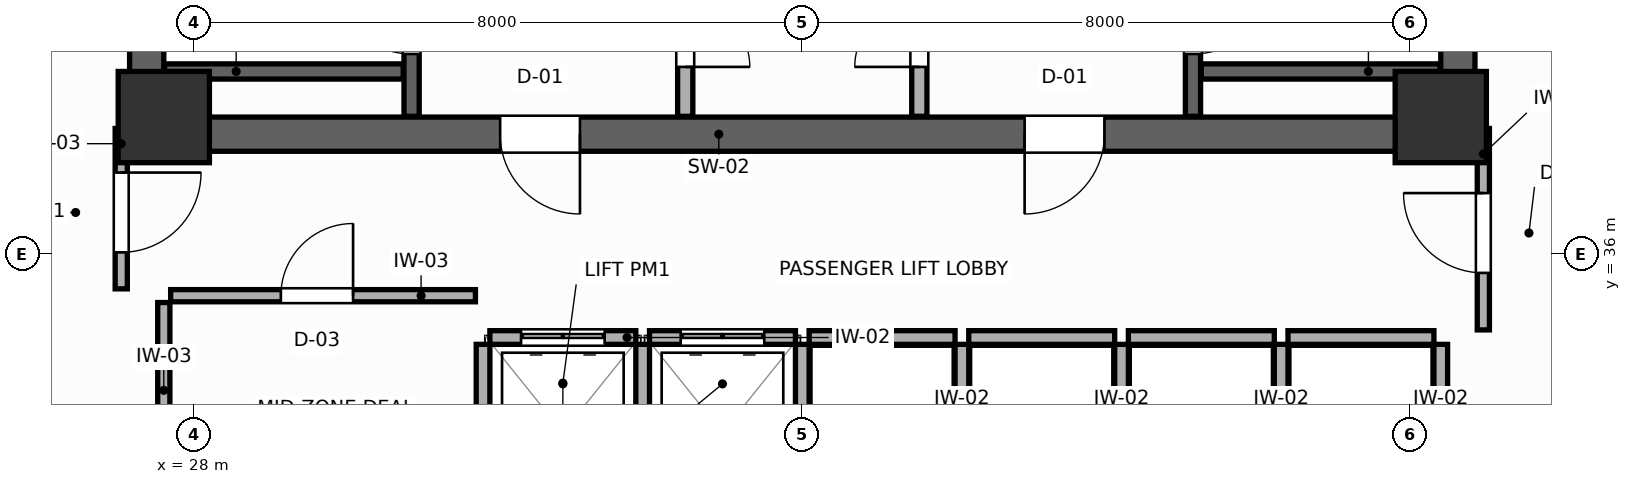
"""IFC4 building model, lengths in metres.
Left out: names, types, materials, properties, quantities, classifications, styles, units other than length and angle.
Written with IfcOpenShell. Run it as: python <this file> out.ifc"""

import sys

from ifc_helpers import new_model, si_unit, direction, frame, frame_2d, origin, origin_2d, place, context, subcontext, project, spatial, rectangle, extrude, source, transform, mapped, element, fill, save


model = new_model("IFC4")
c1 = context("Model", 3, precision=1e-05, world=origin(), true_north=direction((0.0, 1.0)))
c2 = subcontext(c1, "Body", "Model", "MODEL_VIEW")
j1 = project(units=[si_unit("LENGTHUNIT", "METRE"), si_unit("PLANEANGLEUNIT", "RADIAN")], contexts=[c1])
p1 = place(None, origin())
s1 = spatial("IfcSite", under=j1, at=p1, CompositionType="ELEMENT")
p2 = place(p1, origin())
s2 = spatial("IfcBuilding", under=s1, at=p2, CompositionType="ELEMENT")
p3 = place(p2, frame((0.0, 0.0, 127.8)))
s3 = spatial("IfcBuildingStorey", under=s2, at=p3, CompositionType="ELEMENT", Elevation=127.8)
p4 = place(p3, frame((27.15, 37.575, 0.0), z_axis=(0.0, 0.0, 1.0), x_axis=(1.0, 0.0, 0.0)))
e1 = element("IfcWall", 1, at=p4, inside=s3, PredefinedType="SHEAR", context=c2, shape_type="SweptSolid", body=[
    extrude(rectangle(XDim=17.7, YDim=0.45, at=frame_2d((8.85, 0.0))), origin(), (0.0, 0.0, 1.0), 3.6),
])
p5 = place(p4, frame((4.875, 0.0, 0.0)))
e2 = element("IfcOpeningElement", 2, at=p5, cuts=e1, PredefinedType="OPENING", context=c2, shape_type="SweptSolid", body=[
    extrude(rectangle(XDim=1.05, YDim=2.1, at=frame_2d((0.525, 1.05))), frame((0.0, 0.235, 0.0), z_axis=(0.0, -1.0, 0.0), x_axis=(1.0, 0.0, 0.0)), (0.0, 0.0, 1.0), 0.47),
])
p6 = place(p4, frame((11.775, 0.0, 0.0)))
e3 = element("IfcOpeningElement", 3, at=p6, cuts=e1, PredefinedType="OPENING", context=c2, shape_type="SweptSolid", body=[
    extrude(rectangle(XDim=1.05, YDim=2.1, at=frame_2d((0.525, 1.05))), frame((0.0, 0.235, 0.0), z_axis=(0.0, -1.0, 0.0), x_axis=(1.0, 0.0, 0.0)), (0.0, 0.0, 1.0), 0.47),
])
for number, where, z_axis, x_axis in (
    (4, (27.375, 37.8, 0.0), (0.0, 0.0, 1.0), (0.0, 1.0, 0.0)),
    (5, (44.625, 37.8, 0.0), (0.0, 0.0, 1.0), (0.0, 1.0, 0.0)),
):
    element("IfcWall", number, at=place(p3, frame(where, z_axis=z_axis, x_axis=x_axis)), inside=s3, PredefinedType="SHEAR", context=c2, shape_type="SweptSolid", body=[
        extrude(rectangle(XDim=9.0, YDim=0.45, at=frame_2d((4.5, 0.0))), origin(), (0.0, 0.0, 1.0), 3.6),
    ])
m1 = source(origin(), c2, "Body", "SweptSolid", [
    extrude(rectangle(XDim=1.2, YDim=1.2, at=origin_2d()), origin(), (0.0, 0.0, 1.0), 3.6),
])
for number, where, z_axis, x_axis in (
    (6, (27.6, 37.8, 0.0), (0.0, 0.0, 1.0), (1.0, 0.0, 0.0)),
    (7, (44.4, 37.8, 0.0), (0.0, 0.0, 1.0), (1.0, 0.0, 0.0)),
):
    element("IfcColumn", number, at=place(p3, frame(where, z_axis=z_axis, x_axis=x_axis)), inside=s3, PredefinedType="COLUMN", context=c2, shape_type="MappedRepresentation", body=[
        mapped(m1, transform((0.0, 0.0, 0.0), scale=1.0)),
    ])
p7 = place(p3, frame((30.86, 37.81, 0.0), z_axis=(0.0, 0.0, 1.0), x_axis=(0.0, 1.0, 0.0)))
e8 = element("IfcWall", 8, at=p7, inside=s3, PredefinedType="SHEAR", context=c2, shape_type="SweptSolid", body=[
    extrude(rectangle(XDim=8.98, YDim=0.2, at=frame_2d((4.49, 0.0))), origin(), (0.0, 0.0, 1.0), 3.6),
])
p8 = place(p7, frame((0.82, 0.0, 0.0)))
e9 = element("IfcOpeningElement", 9, at=p8, cuts=e8, PredefinedType="OPENING", context=c2, shape_type="SweptSolid", body=[
    extrude(rectangle(XDim=1.05, YDim=2.1, at=frame_2d((0.525, 1.05))), frame((0.0, 0.11, 0.0), z_axis=(0.0, -1.0, 0.0), x_axis=(1.0, 0.0, 0.0)), (0.0, 0.0, 1.0), 0.22),
])
p9 = place(p3, frame((27.61, 38.4, 0.0), z_axis=(0.0, 0.0, 1.0), x_axis=(1.0, 0.0, 0.0)))
e10 = element("IfcWall", 10, at=p9, inside=s3, PredefinedType="SHEAR", context=c2, shape_type="SweptSolid", body=[
    extrude(rectangle(XDim=3.14, YDim=0.2, at=frame_2d((1.57, 0.0))), origin(), (0.0, 0.0, 1.0), 3.6),
])
p10 = place(p3, frame((41.14, 37.81, 0.0), z_axis=(0.0, 0.0, 1.0), x_axis=(0.0, 1.0, 0.0)))
e11 = element("IfcWall", 11, at=p10, inside=s3, PredefinedType="SHEAR", context=c2, shape_type="SweptSolid", body=[
    extrude(rectangle(XDim=8.98, YDim=0.2, at=frame_2d((4.49, 0.0))), origin(), (0.0, 0.0, 1.0), 3.6),
])
p11 = place(p10, frame((0.82, 0.0, 0.0)))
e12 = element("IfcOpeningElement", 12, at=p11, cuts=e11, PredefinedType="OPENING", context=c2, shape_type="SweptSolid", body=[
    extrude(rectangle(XDim=1.05, YDim=2.1, at=frame_2d((0.525, 1.05))), frame((0.0, 0.11, 0.0), z_axis=(0.0, -1.0, 0.0), x_axis=(1.0, 0.0, 0.0)), (0.0, 0.0, 1.0), 0.22),
])
p12 = place(p3, frame((41.25, 38.4, 0.0), z_axis=(0.0, 0.0, 1.0), x_axis=(1.0, 0.0, 0.0)))
e13 = element("IfcWall", 13, at=p12, inside=s3, PredefinedType="SHEAR", context=c2, shape_type="SweptSolid", body=[
    extrude(rectangle(XDim=3.14, YDim=0.2, at=frame_2d((1.57, 0.0))), origin(), (0.0, 0.0, 1.0), 3.6),
])
p13 = place(p3, frame((34.46, 37.81, 0.0), z_axis=(0.0, 0.0, 1.0), x_axis=(0.0, 1.0, 0.0)))
e14 = element("IfcWall", 14, at=p13, inside=s3, PredefinedType="PARTITIONING", context=c2, shape_type="SweptSolid", body=[
    extrude(rectangle(XDim=8.98, YDim=0.2, at=frame_2d((4.49, 0.0))), origin(), (0.0, 0.0, 1.0), 3.26),
])
p14 = place(p13, frame((0.65, 0.0, 0.0)))
e15 = element("IfcOpeningElement", 15, at=p14, cuts=e14, PredefinedType="OPENING", context=c2, shape_type="SweptSolid", body=[
    extrude(rectangle(XDim=0.85, YDim=2.05, at=frame_2d((0.425, 1.025))), frame((0.0, 0.11, 0.0), z_axis=(0.0, -1.0, 0.0), x_axis=(1.0, 0.0, 0.0)), (0.0, 0.0, 1.0), 0.22),
])
p15 = place(p3, frame((37.54, 37.81, 0.0), z_axis=(0.0, 0.0, 1.0), x_axis=(0.0, 1.0, 0.0)))
e16 = element("IfcWall", 16, at=p15, inside=s3, PredefinedType="PARTITIONING", context=c2, shape_type="SweptSolid", body=[
    extrude(rectangle(XDim=8.98, YDim=0.2, at=frame_2d((4.49, 0.0))), origin(), (0.0, 0.0, 1.0), 3.26),
])
p16 = place(p15, frame((0.65, 0.0, 0.0)))
e17 = element("IfcOpeningElement", 17, at=p16, cuts=e16, PredefinedType="OPENING", context=c2, shape_type="SweptSolid", body=[
    extrude(rectangle(XDim=0.85, YDim=2.05, at=frame_2d((0.425, 1.025))), frame((0.0, 0.11, 0.0), z_axis=(0.0, -1.0, 0.0), x_axis=(1.0, 0.0, 0.0)), (0.0, 0.0, 1.0), 0.22),
])
p17 = place(p3, frame((31.89, 34.9, 0.0), z_axis=(0.0, 0.0, 1.0), x_axis=(1.0, 0.0, 0.0)))
e18 = element("IfcWall", 18, at=p17, inside=s3, PredefinedType="PARTITIONING", context=c2, shape_type="SweptSolid", body=[
    extrude(rectangle(XDim=1.92, YDim=0.18, at=frame_2d((0.96, 0.0))), origin(), (0.0, 0.0, 1.0), 3.26),
])
p18 = place(p17, frame((0.41, 0.0, 0.0)))
e19 = element("IfcOpeningElement", 19, at=p18, cuts=e18, PredefinedType="OPENING", context=c2, shape_type="SweptSolid", body=[
    extrude(rectangle(XDim=1.1, YDim=2.1, at=frame_2d((0.55, 1.05))), frame((0.0, 0.1, 0.0), z_axis=(0.0, -1.0, 0.0), x_axis=(1.0, 0.0, 0.0)), (0.0, 0.0, 1.0), 0.2),
])
p19 = place(p3, frame((31.8, 32.49, 0.0), z_axis=(0.0, 0.0, 1.0), x_axis=(0.0, 1.0, 0.0)))
e20 = element("IfcWall", 20, at=p19, inside=s3, PredefinedType="PARTITIONING", context=c2, shape_type="SweptSolid", body=[
    extrude(rectangle(XDim=2.32, YDim=0.18, at=frame_2d((1.16, 0.0))), origin(), (0.0, 0.0, 1.0), 3.26),
])
p20 = place(p3, frame((33.99, 34.9, 0.0), z_axis=(0.0, 0.0, 1.0), x_axis=(1.0, 0.0, 0.0)))
e21 = element("IfcWall", 21, at=p20, inside=s3, PredefinedType="PARTITIONING", context=c2, shape_type="SweptSolid", body=[
    extrude(rectangle(XDim=1.92, YDim=0.18, at=frame_2d((0.96, 0.0))), origin(), (0.0, 0.0, 1.0), 3.26),
])
p21 = place(p20, frame((0.41, 0.0, 0.0)))
e22 = element("IfcOpeningElement", 22, at=p21, cuts=e21, PredefinedType="OPENING", context=c2, shape_type="SweptSolid", body=[
    extrude(rectangle(XDim=1.1, YDim=2.1, at=frame_2d((0.55, 1.05))), frame((0.0, 0.1, 0.0), z_axis=(0.0, -1.0, 0.0), x_axis=(1.0, 0.0, 0.0)), (0.0, 0.0, 1.0), 0.2),
])
p22 = place(p3, frame((33.9, 32.49, 0.0), z_axis=(0.0, 0.0, 1.0), x_axis=(0.0, 1.0, 0.0)))
e23 = element("IfcWall", 23, at=p22, inside=s3, PredefinedType="PARTITIONING", context=c2, shape_type="SweptSolid", body=[
    extrude(rectangle(XDim=2.32, YDim=0.18, at=frame_2d((1.16, 0.0))), origin(), (0.0, 0.0, 1.0), 3.26),
])
p23 = place(p3, frame((36.09, 34.9, 0.0), z_axis=(0.0, 0.0, 1.0), x_axis=(1.0, 0.0, 0.0)))
e24 = element("IfcWall", 24, at=p23, inside=s3, PredefinedType="PARTITIONING", context=c2, shape_type="SweptSolid", body=[
    extrude(rectangle(XDim=1.92, YDim=0.18, at=frame_2d((0.96, 0.0))), origin(), (0.0, 0.0, 1.0), 3.26),
])
p24 = place(p3, frame((36.0, 32.49, 0.0), z_axis=(0.0, 0.0, 1.0), x_axis=(0.0, 1.0, 0.0)))
e25 = element("IfcWall", 25, at=p24, inside=s3, PredefinedType="PARTITIONING", context=c2, shape_type="SweptSolid", body=[
    extrude(rectangle(XDim=2.32, YDim=0.18, at=frame_2d((1.16, 0.0))), origin(), (0.0, 0.0, 1.0), 3.26),
])
p25 = place(p3, frame((38.19, 34.9, 0.0), z_axis=(0.0, 0.0, 1.0), x_axis=(1.0, 0.0, 0.0)))
e26 = element("IfcWall", 26, at=p25, inside=s3, PredefinedType="PARTITIONING", context=c2, shape_type="SweptSolid", body=[
    extrude(rectangle(XDim=1.92, YDim=0.18, at=frame_2d((0.96, 0.0))), origin(), (0.0, 0.0, 1.0), 3.26),
])
p26 = place(p3, frame((38.1, 32.49, 0.0), z_axis=(0.0, 0.0, 1.0), x_axis=(0.0, 1.0, 0.0)))
e27 = element("IfcWall", 27, at=p26, inside=s3, PredefinedType="PARTITIONING", context=c2, shape_type="SweptSolid", body=[
    extrude(rectangle(XDim=2.32, YDim=0.18, at=frame_2d((1.16, 0.0))), origin(), (0.0, 0.0, 1.0), 3.26),
])
p27 = place(p3, frame((40.29, 34.9, 0.0), z_axis=(0.0, 0.0, 1.0), x_axis=(1.0, 0.0, 0.0)))
e28 = element("IfcWall", 28, at=p27, inside=s3, PredefinedType="PARTITIONING", context=c2, shape_type="SweptSolid", body=[
    extrude(rectangle(XDim=1.92, YDim=0.18, at=frame_2d((0.96, 0.0))), origin(), (0.0, 0.0, 1.0), 3.26),
])
p28 = place(p3, frame((40.2, 32.49, 0.0), z_axis=(0.0, 0.0, 1.0), x_axis=(0.0, 1.0, 0.0)))
e29 = element("IfcWall", 29, at=p28, inside=s3, PredefinedType="PARTITIONING", context=c2, shape_type="SweptSolid", body=[
    extrude(rectangle(XDim=2.32, YDim=0.18, at=frame_2d((1.16, 0.0))), origin(), (0.0, 0.0, 1.0), 3.26),
])
p29 = place(p3, frame((42.39, 34.9, 0.0), z_axis=(0.0, 0.0, 1.0), x_axis=(1.0, 0.0, 0.0)))
e30 = element("IfcWall", 30, at=p29, inside=s3, PredefinedType="PARTITIONING", context=c2, shape_type="SweptSolid", body=[
    extrude(rectangle(XDim=1.92, YDim=0.18, at=frame_2d((0.96, 0.0))), origin(), (0.0, 0.0, 1.0), 3.26),
])
for number, where, z_axis, x_axis in (
    (31, (42.3, 32.49, 0.0), (0.0, 0.0, 1.0), (0.0, 1.0, 0.0)),
    (32, (44.4, 32.49, 0.0), (0.0, 0.0, 1.0), (0.0, 1.0, 0.0)),
):
    element("IfcWall", number, at=place(p3, frame(where, z_axis=z_axis, x_axis=x_axis)), inside=s3, PredefinedType="PARTITIONING", context=c2, shape_type="SweptSolid", body=[
        extrude(rectangle(XDim=2.32, YDim=0.18, at=frame_2d((1.16, 0.0))), origin(), (0.0, 0.0, 1.0), 3.26),
    ])
p30 = place(p3, frame((27.6, 33.05, 0.0), z_axis=(0.0, 0.0, 1.0), x_axis=(0.0, 1.0, 0.0)))
e33 = element("IfcWall", 33, at=p30, inside=s3, PredefinedType="PARTITIONING", context=c2, shape_type="SweptSolid", body=[
    extrude(rectangle(XDim=2.31, YDim=0.16, at=frame_2d((1.155, 0.0))), origin(), (0.0, 0.0, 1.0), 3.26),
])
p31 = place(p3, frame((27.69, 35.45, 0.0), z_axis=(0.0, 0.0, 1.0), x_axis=(1.0, 0.0, 0.0)))
e34 = element("IfcWall", 34, at=p31, inside=s3, PredefinedType="PARTITIONING", context=c2, shape_type="SweptSolid", body=[
    extrude(rectangle(XDim=4.01, YDim=0.16, at=frame_2d((2.005, 0.0))), origin(), (0.0, 0.0, 1.0), 3.26),
])
p32 = place(p31, frame((1.45, 0.0, 0.0)))
e35 = element("IfcOpeningElement", 35, at=p32, cuts=e34, PredefinedType="OPENING", context=c2, shape_type="SweptSolid", body=[
    extrude(rectangle(XDim=0.95, YDim=2.05, at=frame_2d((0.475, 1.025))), frame((0.0, 0.09, 0.0), z_axis=(0.0, -1.0, 0.0), x_axis=(1.0, 0.0, 0.0)), (0.0, 0.0, 1.0), 0.18),
])
p33 = place(p3, frame((27.04, 35.54, 0.0), z_axis=(0.0, 0.0, 1.0), x_axis=(0.0, 1.0, 0.0)))
e36 = element("IfcWall", 36, at=p33, inside=s3, PredefinedType="PARTITIONING", context=c2, shape_type="SweptSolid", body=[
    extrude(rectangle(XDim=2.11, YDim=0.16, at=frame_2d((1.055, 0.0))), origin(), (0.0, 0.0, 1.0), 3.26),
])
p34 = place(p33, frame((0.48, 0.0, 0.0)))
e37 = element("IfcOpeningElement", 37, at=p34, cuts=e36, PredefinedType="OPENING", context=c2, shape_type="SweptSolid", body=[
    extrude(rectangle(XDim=1.05, YDim=2.1, at=frame_2d((0.525, 1.05))), frame((0.0, 0.09, 0.0), z_axis=(0.0, -1.0, 0.0), x_axis=(1.0, 0.0, 0.0)), (0.0, 0.0, 1.0), 0.18),
])
p35 = place(p3, frame((44.96, 35.0, 0.0), z_axis=(0.0, 0.0, 1.0), x_axis=(0.0, 1.0, 0.0)))
e38 = element("IfcWall", 38, at=p35, inside=s3, PredefinedType="PARTITIONING", context=c2, shape_type="SweptSolid", body=[
    extrude(rectangle(XDim=2.65, YDim=0.16, at=frame_2d((1.325, 0.0))), origin(), (0.0, 0.0, 1.0), 3.26),
])
p36 = place(p35, frame((0.75, 0.0, 0.0)))
e39 = element("IfcOpeningElement", 39, at=p36, cuts=e38, PredefinedType="OPENING", context=c2, shape_type="SweptSolid", body=[
    extrude(rectangle(XDim=1.05, YDim=2.1, at=frame_2d((0.525, 1.05))), frame((0.0, 0.09, 0.0), z_axis=(0.0, -1.0, 0.0), x_axis=(1.0, 0.0, 0.0)), (0.0, 0.0, 1.0), 0.18),
])
p37 = place(p8, origin())
e40 = element("IfcDoor", 40, at=p37, inside=s3, OperationType="SINGLE_SWING_RIGHT", PredefinedType="DOOR", context=c2, shape_type="SweptSolid", body=[
    extrude(rectangle(XDim=1.05, YDim=2.1, at=frame_2d((0.525, 1.05))), frame((0.0, 0.025, 0.0), z_axis=(0.0, -1.0, 0.0), x_axis=(1.0, 0.0, 0.0)), (0.0, 0.0, 1.0), 0.05),
])
fill(e9, e40)
p38 = place(p11, frame((1.05, 0.0, 0.0), z_axis=(0.0, 0.0, 1.0), x_axis=(-1.0, 0.0, 0.0)))
e41 = element("IfcDoor", 41, at=p38, inside=s3, OperationType="SINGLE_SWING_LEFT", PredefinedType="DOOR", context=c2, shape_type="SweptSolid", body=[
    extrude(rectangle(XDim=1.05, YDim=2.1, at=frame_2d((0.525, 1.05))), frame((0.0, 0.025, 0.0), z_axis=(0.0, -1.0, 0.0), x_axis=(1.0, 0.0, 0.0)), (0.0, 0.0, 1.0), 0.05),
])
fill(e12, e41)
p39 = place(p14, frame((0.85, 0.0, 0.0), z_axis=(0.0, 0.0, 1.0), x_axis=(-1.0, 0.0, 0.0)))
e42 = element("IfcDoor", 42, at=p39, inside=s3, OperationType="SINGLE_SWING_RIGHT", PredefinedType="DOOR", context=c2, shape_type="SweptSolid", body=[
    extrude(rectangle(XDim=0.85, YDim=2.05, at=frame_2d((0.425, 1.025))), frame((0.0, 0.025, 0.0), z_axis=(0.0, -1.0, 0.0), x_axis=(1.0, 0.0, 0.0)), (0.0, 0.0, 1.0), 0.05),
])
fill(e15, e42)
p40 = place(p16, origin())
e43 = element("IfcDoor", 43, at=p40, inside=s3, OperationType="SINGLE_SWING_LEFT", PredefinedType="DOOR", context=c2, shape_type="SweptSolid", body=[
    extrude(rectangle(XDim=0.85, YDim=2.05, at=frame_2d((0.425, 1.025))), frame((0.0, 0.025, 0.0), z_axis=(0.0, -1.0, 0.0), x_axis=(1.0, 0.0, 0.0)), (0.0, 0.0, 1.0), 0.05),
])
fill(e17, e43)
p41 = place(p18, origin())
e44 = element("IfcDoor", 44, at=p41, inside=s3, OperationType="DOUBLE_DOOR_SLIDING", PredefinedType="DOOR", context=c2, shape_type="SweptSolid", body=[
    extrude(rectangle(XDim=1.1, YDim=2.1, at=frame_2d((0.55, 1.05))), frame((0.0, 0.025, 0.0), z_axis=(0.0, -1.0, 0.0), x_axis=(1.0, 0.0, 0.0)), (0.0, 0.0, 1.0), 0.05),
])
fill(e19, e44)
p42 = place(p21, origin())
e45 = element("IfcDoor", 45, at=p42, inside=s3, OperationType="DOUBLE_DOOR_SLIDING", PredefinedType="DOOR", context=c2, shape_type="SweptSolid", body=[
    extrude(rectangle(XDim=1.1, YDim=2.1, at=frame_2d((0.55, 1.05))), frame((0.0, 0.025, 0.0), z_axis=(0.0, -1.0, 0.0), x_axis=(1.0, 0.0, 0.0)), (0.0, 0.0, 1.0), 0.05),
])
fill(e22, e45)
p43 = place(p32, origin())
e46 = element("IfcDoor", 46, at=p43, inside=s3, OperationType="SINGLE_SWING_RIGHT", PredefinedType="DOOR", context=c2, shape_type="SweptSolid", body=[
    extrude(rectangle(XDim=0.95, YDim=2.05, at=frame_2d((0.475, 1.025))), frame((0.0, 0.025, 0.0), z_axis=(0.0, -1.0, 0.0), x_axis=(1.0, 0.0, 0.0)), (0.0, 0.0, 1.0), 0.05),
])
fill(e35, e46)
p44 = place(p34, frame((1.05, 0.0, 0.0), z_axis=(0.0, 0.0, 1.0), x_axis=(-1.0, 0.0, 0.0)))
e47 = element("IfcDoor", 47, at=p44, inside=s3, OperationType="SINGLE_SWING_LEFT", PredefinedType="DOOR", context=c2, shape_type="SweptSolid", body=[
    extrude(rectangle(XDim=1.05, YDim=2.1, at=frame_2d((0.525, 1.05))), frame((0.0, 0.025, 0.0), z_axis=(0.0, -1.0, 0.0), x_axis=(1.0, 0.0, 0.0)), (0.0, 0.0, 1.0), 0.05),
])
fill(e37, e47)
p45 = place(p36, origin())
e48 = element("IfcDoor", 48, at=p45, inside=s3, OperationType="SINGLE_SWING_RIGHT", PredefinedType="DOOR", context=c2, shape_type="SweptSolid", body=[
    extrude(rectangle(XDim=1.05, YDim=2.1, at=frame_2d((0.525, 1.05))), frame((0.0, 0.025, 0.0), z_axis=(0.0, -1.0, 0.0), x_axis=(1.0, 0.0, 0.0)), (0.0, 0.0, 1.0), 0.05),
])
fill(e39, e48)
p46 = place(p5, frame((1.05, 0.0, 0.0), z_axis=(0.0, 0.0, 1.0), x_axis=(-1.0, 0.0, 0.0)))
e49 = element("IfcDoor", 49, at=p46, inside=s3, OperationType="SINGLE_SWING_LEFT", PredefinedType="DOOR", context=c2, shape_type="SweptSolid", body=[
    extrude(rectangle(XDim=1.05, YDim=2.1, at=frame_2d((0.525, 1.05))), frame((0.0, 0.025, 0.0), z_axis=(0.0, -1.0, 0.0), x_axis=(1.0, 0.0, 0.0)), (0.0, 0.0, 1.0), 0.05),
])
fill(e2, e49)
p47 = place(p6, frame((1.05, 0.0, 0.0), z_axis=(0.0, 0.0, 1.0), x_axis=(-1.0, 0.0, 0.0)))
e50 = element("IfcDoor", 50, at=p47, inside=s3, OperationType="SINGLE_SWING_RIGHT", PredefinedType="DOOR", context=c2, shape_type="SweptSolid", body=[
    extrude(rectangle(XDim=1.05, YDim=2.1, at=frame_2d((0.525, 1.05))), frame((0.0, 0.025, 0.0), z_axis=(0.0, -1.0, 0.0), x_axis=(1.0, 0.0, 0.0)), (0.0, 0.0, 1.0), 0.05),
])
fill(e3, e50)
save(model, sys.argv[1])
